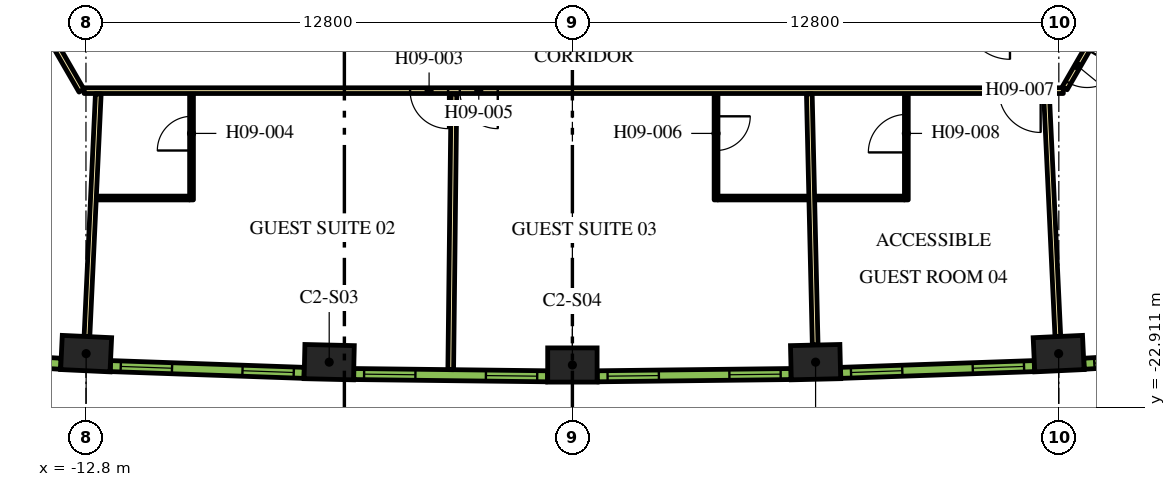
"""IFC4 building model, lengths in metres.
Left out: names, types, materials, properties, quantities, classifications, styles, units other than length and angle.
Written with IfcOpenShell. Run it as: python <this file> out.ifc"""

import sys

from ifc_helpers import new_model, si_unit, direction, frame, frame_2d, origin, origin_2d, place, context, subcontext, project, spatial, rectangle, extrude, element, fill, save


model = new_model("IFC4")
c1 = context("Model", 3, precision=1e-05, world=origin(), true_north=direction((0.0, 1.0)))
c2 = subcontext(c1, "Body", "Model", "MODEL_VIEW")
j1 = project(units=[si_unit("LENGTHUNIT", "METRE"), si_unit("PLANEANGLEUNIT", "RADIAN")], contexts=[c1])
p1 = place(None, origin())
s1 = spatial("IfcSite", under=j1, at=p1, CompositionType="ELEMENT")
p2 = place(p1, origin())
s2 = spatial("IfcBuilding", under=s1, at=p2, CompositionType="ELEMENT")
p3 = place(p2, frame((0.0, 0.0, 122.7)))
s3 = spatial("IfcBuildingStorey", under=s2, at=p3, CompositionType="ELEMENT", Elevation=122.7)
for number, where, z_axis, x_axis in (
    (1, (-12.795, -21.494, 0.0), (0.0, 0.0, 1.0), (0.999, -0.047, 0.0)),
    (2, (-6.399, -21.719, 0.0), (0.0, 0.0, 1.0), (1.0, -0.023, 0.0)),
    (3, (0.0, -21.794, 0.0), (0.0, 0.0, 1.0), (1.0, 0.0, 0.0)),
    (4, (6.399, -21.719, 0.0), (0.0, 0.0, 1.0), (1.0, 0.023, 0.0)),
    (5, (12.795, -21.494, 0.0), (0.0, 0.0, 1.0), (0.999, 0.047, 0.0)),
):
    element("IfcColumn", number, at=place(p3, frame(where, z_axis=z_axis, x_axis=x_axis)), inside=s3, PredefinedType="COLUMN", context=c2, shape_type="SweptSolid", body=[
        extrude(rectangle(XDim=1.3, YDim=0.9, at=origin_2d()), origin(), (0.0, 0.0, 1.0), 3.9),
    ])
p4 = place(p3, frame((-12.918, -14.575, 0.0), z_axis=(0.0, 0.0, 1.0), x_axis=(-0.500009150678, 0.866020120573, 0.0)))
e6 = element("IfcWall", 6, at=p4, inside=s3, PredefinedType="PARTITIONING", context=c2, shape_type="SweptSolid", body=[
    extrude(rectangle(XDim=5.258, YDim=0.15, at=frame_2d((2.629, 0.0))), origin(), (0.0, 0.0, 1.0), 2.75),
])
p5 = place(p3, frame((12.918, -14.575, 0.0), z_axis=(0.0, 0.0, 1.0), x_axis=(-1.0, 0.0, 0.0)))
e7 = element("IfcWall", 7, at=p5, inside=s3, PredefinedType="PARTITIONING", context=c2, shape_type="SweptSolid", body=[
    extrude(rectangle(XDim=25.766, YDim=0.15, at=frame_2d((12.883, 0.0))), origin(), (0.0, 0.0, 1.0), 2.75),
])
p6 = place(p5, frame((16.189, 0.0, 0.0)))
e8 = element("IfcOpeningElement", 8, at=p6, cuts=e7, PredefinedType="OPENING", context=c2, shape_type="SweptSolid", body=[
    extrude(rectangle(XDim=1.0, YDim=2.1, at=frame_2d((0.5, 1.05))), frame((0.0, 0.085, 0.0), z_axis=(0.0, -1.0, 0.0), x_axis=(1.0, 0.0, 0.0)), (0.0, 0.0, 1.0), 0.17),
])
p7 = place(p5, frame((14.882, 0.0, 0.0)))
e9 = element("IfcOpeningElement", 9, at=p7, cuts=e7, PredefinedType="OPENING", context=c2, shape_type="SweptSolid", body=[
    extrude(rectangle(XDim=1.0, YDim=2.1, at=frame_2d((0.5, 1.05))), frame((0.0, 0.085, 0.0), z_axis=(0.0, -1.0, 0.0), x_axis=(1.0, 0.0, 0.0)), (0.0, 0.0, 1.0), 0.17),
])
p8 = place(p5, frame((0.596, 0.0, 0.0)))
e10 = element("IfcOpeningElement", 10, at=p8, cuts=e7, PredefinedType="OPENING", context=c2, shape_type="SweptSolid", body=[
    extrude(rectangle(XDim=1.1, YDim=2.1, at=frame_2d((0.55, 1.05))), frame((0.0, 0.085, 0.0), z_axis=(0.0, -1.0, 0.0), x_axis=(1.0, 0.0, 0.0)), (0.0, 0.0, 1.0), 0.17),
])
p9 = place(p3, frame((15.587, -9.952, 0.0), z_axis=(0.0, 0.0, 1.0), x_axis=(-0.500016618951, -0.866015808616, 0.0)))
e11 = element("IfcWall", 11, at=p9, inside=s3, PredefinedType="PARTITIONING", context=c2, shape_type="SweptSolid", body=[
    extrude(rectangle(XDim=5.268, YDim=0.15, at=frame_2d((2.634, 0.0))), origin(), (0.0, 0.0, 1.0), 2.75),
])
p10 = place(p9, frame((4.088, 0.0, 0.0)))
e12 = element("IfcOpeningElement", 12, at=p10, cuts=e11, PredefinedType="OPENING", context=c2, shape_type="SweptSolid", body=[
    extrude(rectangle(XDim=1.0, YDim=2.1, at=frame_2d((0.5, 1.05))), frame((0.0, 0.085, 0.0), z_axis=(0.0, -1.0, 0.0), x_axis=(1.0, 0.0, 0.0)), (0.0, 0.0, 1.0), 0.17),
])
p11 = place(p3, frame((-12.774, -21.045, 0.0), z_axis=(0.0, 0.0, 1.0), x_axis=(0.046750341626, 0.998906605023, 0.0)))
e13 = element("IfcWall", 13, at=p11, inside=s3, PredefinedType="PARTITIONING", context=c2, shape_type="SweptSolid", body=[
    extrude(rectangle(XDim=6.392, YDim=0.15, at=frame_2d((3.196, 0.0))), origin(), (0.0, 0.0, 1.0), 2.75),
])
p12 = place(p3, frame((-3.202, -21.916, 0.0), z_axis=(0.0, 0.0, 1.0), x_axis=(0.011707696285, 0.999931462575, 0.0)))
e14 = element("IfcWall", 14, at=p12, inside=s3, PredefinedType="PARTITIONING", context=c2, shape_type="SweptSolid", body=[
    extrude(rectangle(XDim=7.257, YDim=0.15, at=frame_2d((3.628, 0.0))), origin(), (0.0, 0.0, 1.0), 2.75),
])
p13 = place(p3, frame((6.389, -21.269, 0.0), z_axis=(0.0, 0.0, 1.0), x_axis=(-0.023377429176, 0.999726710559, 0.0)))
e15 = element("IfcWall", 15, at=p13, inside=s3, PredefinedType="PARTITIONING", context=c2, shape_type="SweptSolid", body=[
    extrude(rectangle(XDim=6.611, YDim=0.15, at=frame_2d((3.305, 0.0))), origin(), (0.0, 0.0, 1.0), 2.75),
])
p14 = place(p3, frame((12.774, -21.045, 0.0), z_axis=(0.0, 0.0, 1.0), x_axis=(-0.046750341626, 0.998906605023, 0.0)))
e16 = element("IfcWall", 16, at=p14, inside=s3, PredefinedType="PARTITIONING", context=c2, shape_type="SweptSolid", body=[
    extrude(rectangle(XDim=6.392, YDim=0.15, at=frame_2d((3.196, 0.0))), origin(), (0.0, 0.0, 1.0), 2.75),
])
p15 = place(p3, frame((-10.022, -17.45, 0.0), z_axis=(0.0, 0.0, 1.0), x_axis=(0.0, 1.0, 0.0)))
e17 = element("IfcWall", 17, at=p15, inside=s3, PredefinedType="PARTITIONING", context=c2, shape_type="SweptSolid", body=[
    extrude(rectangle(XDim=2.8, YDim=0.1, at=frame_2d((1.4, 0.0))), origin(), (0.0, 0.0, 1.0), 2.75),
])
p16 = place(p15, frame((1.3, 0.0, 0.0)))
e18 = element("IfcOpeningElement", 18, at=p16, cuts=e17, PredefinedType="OPENING", context=c2, shape_type="SweptSolid", body=[
    extrude(rectangle(XDim=0.9, YDim=2.1, at=frame_2d((0.45, 1.05))), frame((0.0, 0.06, 0.0), z_axis=(0.0, -1.0, 0.0), x_axis=(1.0, 0.0, 0.0)), (0.0, 0.0, 1.0), 0.12),
])
p17 = place(p3, frame((-10.072, -17.4, 0.0), z_axis=(0.0, 0.0, 1.0), x_axis=(-1.0, 0.0, 0.0)))
e19 = element("IfcWall", 19, at=p17, inside=s3, PredefinedType="PARTITIONING", context=c2, shape_type="SweptSolid", body=[
    extrude(rectangle(XDim=2.45, YDim=0.1, at=frame_2d((1.225, 0.0))), origin(), (0.0, 0.0, 1.0), 2.75),
])
p18 = place(p3, frame((3.78, -14.65, 0.0), z_axis=(0.0, 0.0, 1.0), x_axis=(0.0, -1.0, 0.0)))
e20 = element("IfcWall", 20, at=p18, inside=s3, PredefinedType="PARTITIONING", context=c2, shape_type="SweptSolid", body=[
    extrude(rectangle(XDim=2.8, YDim=0.1, at=frame_2d((1.4, 0.0))), origin(), (0.0, 0.0, 1.0), 2.75),
])
p19 = place(p18, frame((0.6, 0.0, 0.0)))
e21 = element("IfcOpeningElement", 21, at=p19, cuts=e20, PredefinedType="OPENING", context=c2, shape_type="SweptSolid", body=[
    extrude(rectangle(XDim=0.9, YDim=2.1, at=frame_2d((0.45, 1.05))), frame((0.0, 0.06, 0.0), z_axis=(0.0, -1.0, 0.0), x_axis=(1.0, 0.0, 0.0)), (0.0, 0.0, 1.0), 0.12),
])
p20 = place(p3, frame((3.83, -17.4, 0.0), z_axis=(0.0, 0.0, 1.0), x_axis=(1.0, 0.0, 0.0)))
e22 = element("IfcWall", 22, at=p20, inside=s3, PredefinedType="PARTITIONING", context=c2, shape_type="SweptSolid", body=[
    extrude(rectangle(XDim=2.39, YDim=0.1, at=frame_2d((1.195, 0.0))), origin(), (0.0, 0.0, 1.0), 2.75),
])
p21 = place(p3, frame((8.788, -17.45, 0.0), z_axis=(0.0, 0.0, 1.0), x_axis=(0.0, 1.0, 0.0)))
e23 = element("IfcWall", 23, at=p21, inside=s3, PredefinedType="PARTITIONING", context=c2, shape_type="SweptSolid", body=[
    extrude(rectangle(XDim=2.8, YDim=0.1, at=frame_2d((1.4, 0.0))), origin(), (0.0, 0.0, 1.0), 2.75),
])
p22 = place(p21, frame((1.25, 0.0, 0.0)))
e24 = element("IfcOpeningElement", 24, at=p22, cuts=e23, PredefinedType="OPENING", context=c2, shape_type="SweptSolid", body=[
    extrude(rectangle(XDim=1.0, YDim=2.1, at=frame_2d((0.5, 1.05))), frame((0.0, 0.06, 0.0), z_axis=(0.0, -1.0, 0.0), x_axis=(1.0, 0.0, 0.0)), (0.0, 0.0, 1.0), 0.12),
])
p23 = place(p3, frame((8.738, -17.4, 0.0), z_axis=(0.0, 0.0, 1.0), x_axis=(-1.0, 0.0, 0.0)))
e25 = element("IfcWall", 25, at=p23, inside=s3, PredefinedType="PARTITIONING", context=c2, shape_type="SweptSolid", body=[
    extrude(rectangle(XDim=2.36, YDim=0.1, at=frame_2d((1.18, 0.0))), origin(), (0.0, 0.0, 1.0), 2.75),
])
p24 = place(p3, frame((-18.553, -21.463, 0.0), z_axis=(0.0, 0.0, 1.0), x_axis=(0.998290511436, -0.058447025388, 0.0)))
e26 = element("IfcWall", 26, at=p24, inside=s3, PredefinedType="SOLIDWALL", context=c2, shape_type="SweptSolid", body=[
    extrude(rectangle(XDim=5.1, YDim=0.29, at=frame_2d((2.55, 0.0))), origin(), (0.0, 0.0, 1.0), 3.65),
])
p25 = place(p24, frame((0.273, 0.0, 0.9)))
e27 = element("IfcOpeningElement", 27, at=p25, cuts=e26, PredefinedType="OPENING", context=c2, shape_type="SweptSolid", body=[
    extrude(rectangle(XDim=1.35, YDim=2.15, at=frame_2d((0.675, 1.075))), frame((0.0, 0.155, 0.0), z_axis=(0.0, -1.0, 0.0), x_axis=(1.0, 0.0, 0.0)), (0.0, 0.0, 1.0), 0.31),
])
p26 = place(p24, frame((3.478, 0.0, 0.9)))
e28 = element("IfcOpeningElement", 28, at=p26, cuts=e26, PredefinedType="OPENING", context=c2, shape_type="SweptSolid", body=[
    extrude(rectangle(XDim=1.35, YDim=2.15, at=frame_2d((0.675, 1.075))), frame((0.0, 0.155, 0.0), z_axis=(0.0, -1.0, 0.0), x_axis=(1.0, 0.0, 0.0)), (0.0, 0.0, 1.0), 0.31),
])
p27 = place(p3, frame((-12.157, -21.822, 0.0), z_axis=(0.0, 0.0, 1.0), x_axis=(0.999385993957, -0.035037623812, 0.0)))
e29 = element("IfcWall", 29, at=p27, inside=s3, PredefinedType="SOLIDWALL", context=c2, shape_type="SweptSolid", body=[
    extrude(rectangle(XDim=5.101, YDim=0.29, at=frame_2d((2.55, 0.0))), origin(), (0.0, 0.0, 1.0), 3.65),
])
p28 = place(p27, frame((0.273, 0.0, 0.9)))
e30 = element("IfcOpeningElement", 30, at=p28, cuts=e29, PredefinedType="OPENING", context=c2, shape_type="SweptSolid", body=[
    extrude(rectangle(XDim=1.35, YDim=2.15, at=frame_2d((0.675, 1.075))), frame((0.0, 0.155, 0.0), z_axis=(0.0, -1.0, 0.0), x_axis=(1.0, 0.0, 0.0)), (0.0, 0.0, 1.0), 0.31),
])
p29 = place(p27, frame((3.478, 0.0, 0.9)))
e31 = element("IfcOpeningElement", 31, at=p29, cuts=e29, PredefinedType="OPENING", context=c2, shape_type="SweptSolid", body=[
    extrude(rectangle(XDim=1.35, YDim=2.15, at=frame_2d((0.675, 1.075))), frame((0.0, 0.155, 0.0), z_axis=(0.0, -1.0, 0.0), x_axis=(1.0, 0.0, 0.0)), (0.0, 0.0, 1.0), 0.31),
])
p30 = place(p3, frame((-5.753, -22.031, 0.0), z_axis=(0.0, 0.0, 1.0), x_axis=(0.999931786565, -0.011679992145, 0.0)))
e32 = element("IfcWall", 32, at=p30, inside=s3, PredefinedType="SOLIDWALL", context=c2, shape_type="SweptSolid", body=[
    extrude(rectangle(XDim=5.1, YDim=0.29, at=frame_2d((2.55, 0.0))), origin(), (0.0, 0.0, 1.0), 3.65),
])
p31 = place(p30, frame((0.272, 0.0, 0.9)))
e33 = element("IfcOpeningElement", 33, at=p31, cuts=e32, PredefinedType="OPENING", context=c2, shape_type="SweptSolid", body=[
    extrude(rectangle(XDim=1.35, YDim=2.15, at=frame_2d((0.675, 1.075))), frame((0.0, 0.155, 0.0), z_axis=(0.0, -1.0, 0.0), x_axis=(1.0, 0.0, 0.0)), (0.0, 0.0, 1.0), 0.31),
])
p32 = place(p30, frame((3.478, 0.0, 0.9)))
e34 = element("IfcOpeningElement", 34, at=p32, cuts=e32, PredefinedType="OPENING", context=c2, shape_type="SweptSolid", body=[
    extrude(rectangle(XDim=1.35, YDim=2.15, at=frame_2d((0.675, 1.075))), frame((0.0, 0.155, 0.0), z_axis=(0.0, -1.0, 0.0), x_axis=(1.0, 0.0, 0.0)), (0.0, 0.0, 1.0), 0.31),
])
p33 = place(p3, frame((0.653, -22.091, 0.0), z_axis=(0.0, 0.0, 1.0), x_axis=(0.999931786565, 0.011679992145, 0.0)))
e35 = element("IfcWall", 35, at=p33, inside=s3, PredefinedType="SOLIDWALL", context=c2, shape_type="SweptSolid", body=[
    extrude(rectangle(XDim=5.1, YDim=0.29, at=frame_2d((2.55, 0.0))), origin(), (0.0, 0.0, 1.0), 3.65),
])
p34 = place(p33, frame((0.273, 0.0, 0.9)))
e36 = element("IfcOpeningElement", 36, at=p34, cuts=e35, PredefinedType="OPENING", context=c2, shape_type="SweptSolid", body=[
    extrude(rectangle(XDim=1.35, YDim=2.15, at=frame_2d((0.675, 1.075))), frame((0.0, 0.155, 0.0), z_axis=(0.0, -1.0, 0.0), x_axis=(1.0, 0.0, 0.0)), (0.0, 0.0, 1.0), 0.31),
])
p35 = place(p33, frame((3.478, 0.0, 0.9)))
e37 = element("IfcOpeningElement", 37, at=p35, cuts=e35, PredefinedType="OPENING", context=c2, shape_type="SweptSolid", body=[
    extrude(rectangle(XDim=1.35, YDim=2.15, at=frame_2d((0.675, 1.075))), frame((0.0, 0.155, 0.0), z_axis=(0.0, -1.0, 0.0), x_axis=(1.0, 0.0, 0.0)), (0.0, 0.0, 1.0), 0.31),
])
p36 = place(p3, frame((7.059, -22.001, 0.0), z_axis=(0.0, 0.0, 1.0), x_axis=(0.999385993957, 0.035037623812, 0.0)))
e38 = element("IfcWall", 38, at=p36, inside=s3, PredefinedType="SOLIDWALL", context=c2, shape_type="SweptSolid", body=[
    extrude(rectangle(XDim=5.101, YDim=0.29, at=frame_2d((2.55, 0.0))), origin(), (0.0, 0.0, 1.0), 3.65),
])
p37 = place(p36, frame((0.273, 0.0, 0.9)))
e39 = element("IfcOpeningElement", 39, at=p37, cuts=e38, PredefinedType="OPENING", context=c2, shape_type="SweptSolid", body=[
    extrude(rectangle(XDim=1.35, YDim=2.15, at=frame_2d((0.675, 1.075))), frame((0.0, 0.155, 0.0), z_axis=(0.0, -1.0, 0.0), x_axis=(1.0, 0.0, 0.0)), (0.0, 0.0, 1.0), 0.31),
])
p38 = place(p36, frame((3.478, 0.0, 0.9)))
e40 = element("IfcOpeningElement", 40, at=p38, cuts=e38, PredefinedType="OPENING", context=c2, shape_type="SweptSolid", body=[
    extrude(rectangle(XDim=1.35, YDim=2.15, at=frame_2d((0.675, 1.075))), frame((0.0, 0.155, 0.0), z_axis=(0.0, -1.0, 0.0), x_axis=(1.0, 0.0, 0.0)), (0.0, 0.0, 1.0), 0.31),
])
p39 = place(p3, frame((13.462, -21.761, 0.0), z_axis=(0.0, 0.0, 1.0), x_axis=(0.998290511436, 0.058447025388, 0.0)))
e41 = element("IfcWall", 41, at=p39, inside=s3, PredefinedType="SOLIDWALL", context=c2, shape_type="SweptSolid", body=[
    extrude(rectangle(XDim=5.1, YDim=0.29, at=frame_2d((2.55, 0.0))), origin(), (0.0, 0.0, 1.0), 3.65),
])
p40 = place(p39, frame((0.272, 0.0, 0.9)))
e42 = element("IfcOpeningElement", 42, at=p40, cuts=e41, PredefinedType="OPENING", context=c2, shape_type="SweptSolid", body=[
    extrude(rectangle(XDim=1.35, YDim=2.15, at=frame_2d((0.675, 1.075))), frame((0.0, 0.155, 0.0), z_axis=(0.0, -1.0, 0.0), x_axis=(1.0, 0.0, 0.0)), (0.0, 0.0, 1.0), 0.31),
])
p41 = place(p39, frame((3.478, 0.0, 0.9)))
e43 = element("IfcOpeningElement", 43, at=p41, cuts=e41, PredefinedType="OPENING", context=c2, shape_type="SweptSolid", body=[
    extrude(rectangle(XDim=1.35, YDim=2.15, at=frame_2d((0.675, 1.075))), frame((0.0, 0.155, 0.0), z_axis=(0.0, -1.0, 0.0), x_axis=(1.0, 0.0, 0.0)), (0.0, 0.0, 1.0), 0.31),
])
p42 = place(p6, origin())
e44 = element("IfcDoor", 44, at=p42, inside=s3, OperationType="SINGLE_SWING_LEFT", PredefinedType="DOOR", context=c2, shape_type="SweptSolid", body=[
    extrude(rectangle(XDim=1.0, YDim=2.1, at=frame_2d((0.5, 1.05))), frame((0.0, 0.025, 0.0), z_axis=(0.0, -1.0, 0.0), x_axis=(1.0, 0.0, 0.0)), (0.0, 0.0, 1.0), 0.05),
])
fill(e8, e44)
p43 = place(p16, origin())
e45 = element("IfcDoor", 45, at=p43, inside=s3, OperationType="SINGLE_SWING_LEFT", PredefinedType="DOOR", context=c2, shape_type="SweptSolid", body=[
    extrude(rectangle(XDim=0.9, YDim=2.1, at=frame_2d((0.45, 1.05))), frame((0.0, 0.025, 0.0), z_axis=(0.0, -1.0, 0.0), x_axis=(1.0, 0.0, 0.0)), (0.0, 0.0, 1.0), 0.05),
])
fill(e18, e45)
p44 = place(p7, origin())
e46 = element("IfcDoor", 46, at=p44, inside=s3, OperationType="SINGLE_SWING_RIGHT", PredefinedType="DOOR", context=c2, shape_type="SweptSolid", body=[
    extrude(rectangle(XDim=1.0, YDim=2.1, at=frame_2d((0.5, 1.05))), frame((0.0, 0.025, 0.0), z_axis=(0.0, -1.0, 0.0), x_axis=(1.0, 0.0, 0.0)), (0.0, 0.0, 1.0), 0.05),
])
fill(e9, e46)
p45 = place(p19, origin())
e47 = element("IfcDoor", 47, at=p45, inside=s3, OperationType="SINGLE_SWING_RIGHT", PredefinedType="DOOR", context=c2, shape_type="SweptSolid", body=[
    extrude(rectangle(XDim=0.9, YDim=2.1, at=frame_2d((0.45, 1.05))), frame((0.0, 0.025, 0.0), z_axis=(0.0, -1.0, 0.0), x_axis=(1.0, 0.0, 0.0)), (0.0, 0.0, 1.0), 0.05),
])
fill(e21, e47)
p46 = place(p8, origin())
e48 = element("IfcDoor", 48, at=p46, inside=s3, OperationType="SINGLE_SWING_LEFT", PredefinedType="DOOR", context=c2, shape_type="SweptSolid", body=[
    extrude(rectangle(XDim=1.1, YDim=2.1, at=frame_2d((0.55, 1.05))), frame((0.0, 0.025, 0.0), z_axis=(0.0, -1.0, 0.0), x_axis=(1.0, 0.0, 0.0)), (0.0, 0.0, 1.0), 0.05),
])
fill(e10, e48)
p47 = place(p22, origin())
e49 = element("IfcDoor", 49, at=p47, inside=s3, OperationType="SINGLE_SWING_LEFT", PredefinedType="DOOR", context=c2, shape_type="SweptSolid", body=[
    extrude(rectangle(XDim=1.0, YDim=2.1, at=frame_2d((0.5, 1.05))), frame((0.0, 0.025, 0.0), z_axis=(0.0, -1.0, 0.0), x_axis=(1.0, 0.0, 0.0)), (0.0, 0.0, 1.0), 0.05),
])
fill(e24, e49)
p48 = place(p10, origin())
e50 = element("IfcDoor", 50, at=p48, inside=s3, OperationType="SINGLE_SWING_RIGHT", PredefinedType="DOOR", context=c2, shape_type="SweptSolid", body=[
    extrude(rectangle(XDim=1.0, YDim=2.1, at=frame_2d((0.5, 1.05))), frame((0.0, 0.025, 0.0), z_axis=(0.0, -1.0, 0.0), x_axis=(1.0, 0.0, 0.0)), (0.0, 0.0, 1.0), 0.05),
])
fill(e12, e50)
p49 = place(p28, origin())
e51 = element("IfcWindow", 51, at=p49, inside=s3, PartitioningType="DOUBLE_PANEL_VERTICAL", PredefinedType="WINDOW", context=c2, shape_type="SweptSolid", body=[
    extrude(rectangle(XDim=1.35, YDim=2.15, at=frame_2d((0.675, 1.075))), frame((0.0, 0.015, 0.0), z_axis=(0.0, -1.0, 0.0), x_axis=(1.0, 0.0, 0.0)), (0.0, 0.0, 1.0), 0.06),
])
fill(e30, e51)
p50 = place(p29, origin())
e52 = element("IfcWindow", 52, at=p50, inside=s3, PartitioningType="DOUBLE_PANEL_VERTICAL", PredefinedType="WINDOW", context=c2, shape_type="SweptSolid", body=[
    extrude(rectangle(XDim=1.35, YDim=2.15, at=frame_2d((0.675, 1.075))), frame((0.0, 0.015, 0.0), z_axis=(0.0, -1.0, 0.0), x_axis=(1.0, 0.0, 0.0)), (0.0, 0.0, 1.0), 0.06),
])
fill(e31, e52)
p51 = place(p31, origin())
e53 = element("IfcWindow", 53, at=p51, inside=s3, PartitioningType="DOUBLE_PANEL_VERTICAL", PredefinedType="WINDOW", context=c2, shape_type="SweptSolid", body=[
    extrude(rectangle(XDim=1.35, YDim=2.15, at=frame_2d((0.675, 1.075))), frame((0.0, 0.015, 0.0), z_axis=(0.0, -1.0, 0.0), x_axis=(1.0, 0.0, 0.0)), (0.0, 0.0, 1.0), 0.06),
])
fill(e33, e53)
p52 = place(p32, origin())
e54 = element("IfcWindow", 54, at=p52, inside=s3, PartitioningType="DOUBLE_PANEL_VERTICAL", PredefinedType="WINDOW", context=c2, shape_type="SweptSolid", body=[
    extrude(rectangle(XDim=1.35, YDim=2.15, at=frame_2d((0.675, 1.075))), frame((0.0, 0.015, 0.0), z_axis=(0.0, -1.0, 0.0), x_axis=(1.0, 0.0, 0.0)), (0.0, 0.0, 1.0), 0.06),
])
fill(e34, e54)
p53 = place(p34, origin())
e55 = element("IfcWindow", 55, at=p53, inside=s3, PartitioningType="DOUBLE_PANEL_VERTICAL", PredefinedType="WINDOW", context=c2, shape_type="SweptSolid", body=[
    extrude(rectangle(XDim=1.35, YDim=2.15, at=frame_2d((0.675, 1.075))), frame((0.0, 0.015, 0.0), z_axis=(0.0, -1.0, 0.0), x_axis=(1.0, 0.0, 0.0)), (0.0, 0.0, 1.0), 0.06),
])
fill(e36, e55)
p54 = place(p35, origin())
e56 = element("IfcWindow", 56, at=p54, inside=s3, PartitioningType="DOUBLE_PANEL_VERTICAL", PredefinedType="WINDOW", context=c2, shape_type="SweptSolid", body=[
    extrude(rectangle(XDim=1.35, YDim=2.15, at=frame_2d((0.675, 1.075))), frame((0.0, 0.015, 0.0), z_axis=(0.0, -1.0, 0.0), x_axis=(1.0, 0.0, 0.0)), (0.0, 0.0, 1.0), 0.06),
])
fill(e37, e56)
p55 = place(p37, origin())
e57 = element("IfcWindow", 57, at=p55, inside=s3, PartitioningType="DOUBLE_PANEL_VERTICAL", PredefinedType="WINDOW", context=c2, shape_type="SweptSolid", body=[
    extrude(rectangle(XDim=1.35, YDim=2.15, at=frame_2d((0.675, 1.075))), frame((0.0, 0.015, 0.0), z_axis=(0.0, -1.0, 0.0), x_axis=(1.0, 0.0, 0.0)), (0.0, 0.0, 1.0), 0.06),
])
fill(e39, e57)
p56 = place(p38, origin())
e58 = element("IfcWindow", 58, at=p56, inside=s3, PartitioningType="DOUBLE_PANEL_VERTICAL", PredefinedType="WINDOW", context=c2, shape_type="SweptSolid", body=[
    extrude(rectangle(XDim=1.35, YDim=2.15, at=frame_2d((0.675, 1.075))), frame((0.0, 0.015, 0.0), z_axis=(0.0, -1.0, 0.0), x_axis=(1.0, 0.0, 0.0)), (0.0, 0.0, 1.0), 0.06),
])
fill(e40, e58)
p57 = place(p40, origin())
e59 = element("IfcWindow", 59, at=p57, inside=s3, PartitioningType="DOUBLE_PANEL_VERTICAL", PredefinedType="WINDOW", context=c2, shape_type="SweptSolid", body=[
    extrude(rectangle(XDim=1.35, YDim=2.15, at=frame_2d((0.675, 1.075))), frame((0.0, 0.015, 0.0), z_axis=(0.0, -1.0, 0.0), x_axis=(1.0, 0.0, 0.0)), (0.0, 0.0, 1.0), 0.06),
])
fill(e42, e59)
save(model, sys.argv[1])
